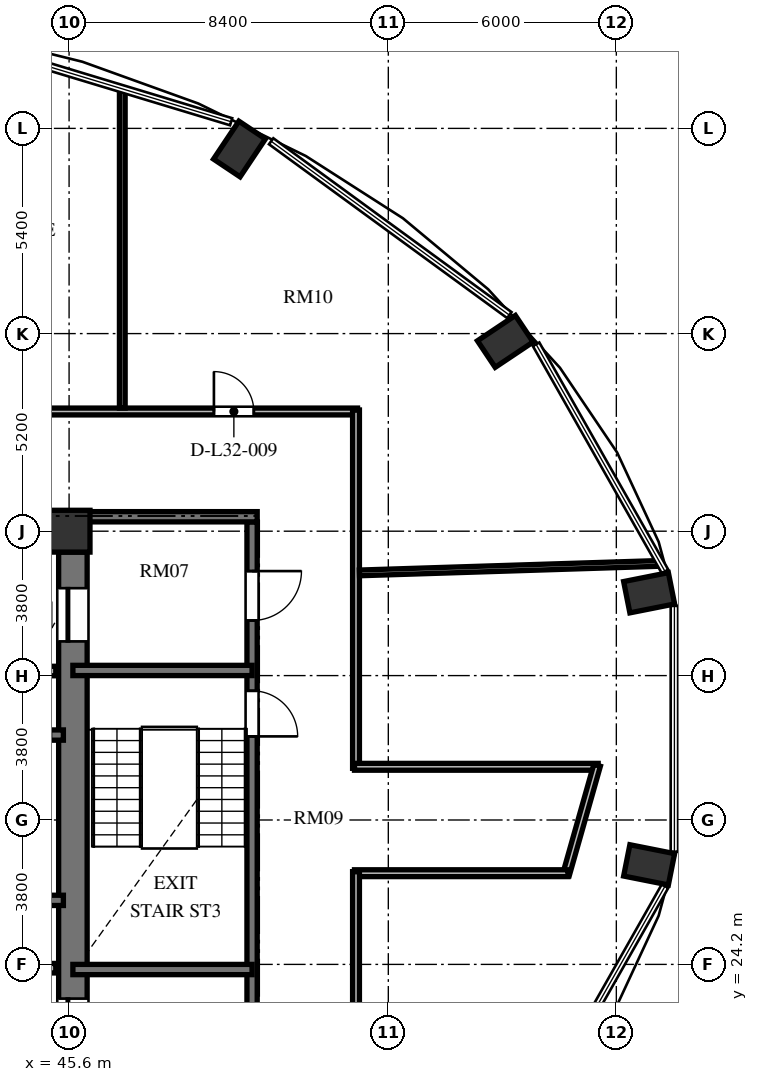
"""IFC4 building model, lengths in metres.
Left out: names, types, materials, properties, quantities, classifications, styles, units other than length and angle.
Written with IfcOpenShell. Run it as: python <this file> out.ifc"""

import sys

from ifc_helpers import new_model, si_unit, direction, frame, frame_2d, origin, origin_2d, place, context, subcontext, project, spatial, rectangle, extrude, element, fill, save


model = new_model("IFC4")
c1 = context("Model", 3, precision=1e-05, world=origin(), true_north=direction((0.0, 1.0)))
c2 = subcontext(c1, "Body", "Model", "MODEL_VIEW")
j1 = project(units=[si_unit("LENGTHUNIT", "METRE"), si_unit("PLANEANGLEUNIT", "RADIAN")], contexts=[c1])
p1 = place(None, origin())
s1 = spatial("IfcSite", under=j1, at=p1, CompositionType="ELEMENT")
p2 = place(p1, origin())
s2 = spatial("IfcBuilding", under=s1, at=p2, CompositionType="ELEMENT")
p3 = place(p2, frame((0.0, 0.0, 125.52)))
s3 = spatial("IfcBuildingStorey", under=s2, at=p3, CompositionType="ELEMENT", Elevation=125.52)
for number, where, z_axis, x_axis in (
    (1, (60.863, 26.82, 0.0), (0.0, 0.0, 1.0), (0.981, -0.195, 0.0)),
    (2, (60.863, 33.98, 0.0), (0.0, 0.0, 1.0), (0.981, 0.195, 0.0)),
    (3, (57.078, 40.595, 0.0), (0.0, 0.0, 1.0), (0.831, 0.556, 0.0)),
    (4, (50.084, 45.657, 0.0), (0.0, 0.0, 1.0), (0.556, 0.831, 0.0)),
):
    element("IfcColumn", number, at=place(p3, frame(where, z_axis=z_axis, x_axis=x_axis)), inside=s3, PredefinedType="COLUMN", context=c2, shape_type="SweptSolid", body=[
        extrude(rectangle(XDim=1.2, YDim=0.84, at=origin_2d()), origin(), (0.0, 0.0, 1.0), 3.648),
    ])
p4 = place(p3, frame((45.6, 35.6, 0.0), z_axis=(0.0, 0.0, 1.0), x_axis=(1.0, 0.0, 0.0)))
e5 = element("IfcColumn", 5, at=p4, inside=s3, PredefinedType="COLUMN", context=c2, shape_type="SweptSolid", body=[
    extrude(rectangle(XDim=1.1, YDim=1.1, at=origin_2d()), origin(), (0.0, 0.0, 1.0), 3.648),
])
p5 = place(p3, frame((45.7, 20.95, 0.0), z_axis=(0.0, 0.0, 1.0), x_axis=(0.0, 1.0, 0.0)))
e6 = element("IfcWall", 6, at=p5, inside=s3, PredefinedType="SHEAR", context=c2, shape_type="SweptSolid", body=[
    extrude(rectangle(XDim=14.1, YDim=0.75, at=frame_2d((7.05, 0.0))), origin(), (0.0, 0.0, 1.0), 3.648),
])
p6 = place(p5, frame((11.75, 0.0, 0.0)))
e7 = element("IfcOpeningElement", 7, at=p6, cuts=e6, PredefinedType="OPENING", context=c2, shape_type="SweptSolid", body=[
    extrude(rectangle(XDim=1.4, YDim=2.3, at=frame_2d((0.7, 1.15))), frame((0.0, 0.385, 0.0), z_axis=(0.0, -1.0, 0.0), x_axis=(1.0, 0.0, 0.0)), (0.0, 0.0, 1.0), 0.77),
])
p7 = place(p5, frame((0.95, 0.0, 0.0)))
e8 = element("IfcOpeningElement", 8, at=p7, cuts=e6, PredefinedType="OPENING", context=c2, shape_type="SweptSolid", body=[
    extrude(rectangle(XDim=1.4, YDim=2.3, at=frame_2d((0.7, 1.15))), frame((0.0, 0.385, 0.0), z_axis=(0.0, -1.0, 0.0), x_axis=(1.0, 0.0, 0.0)), (0.0, 0.0, 1.0), 0.77),
])
p8 = place(p3, frame((37.465, 30.235, 0.0), z_axis=(0.0, 0.0, 1.0), x_axis=(1.0, 0.0, 0.0)))
e9 = element("IfcWall", 9, at=p8, inside=s3, PredefinedType="SHEAR", context=c2, shape_type="SweptSolid", body=[
    extrude(rectangle(XDim=7.985, YDim=0.27, at=frame_2d((3.992, 0.0))), origin(), (0.0, 0.0, 1.0), 3.648),
])
p9 = place(p8, frame((6.455, 0.0, 0.0)))
e10 = element("IfcOpeningElement", 10, at=p9, cuts=e9, PredefinedType="OPENING", context=c2, shape_type="SweptSolid", body=[
    extrude(rectangle(XDim=1.2, YDim=2.15, at=frame_2d((0.6, 1.075))), frame((0.0, 0.145, 0.0), z_axis=(0.0, -1.0, 0.0), x_axis=(1.0, 0.0, 0.0)), (0.0, 0.0, 1.0), 0.29),
])
p10 = place(p3, frame((37.465, 25.885, 0.0), z_axis=(0.0, 0.0, 1.0), x_axis=(1.0, 0.0, 0.0)))
e11 = element("IfcWall", 11, at=p10, inside=s3, PredefinedType="SHEAR", context=c2, shape_type="SweptSolid", body=[
    extrude(rectangle(XDim=7.985, YDim=0.27, at=frame_2d((3.992, 0.0))), origin(), (0.0, 0.0, 1.0), 3.648),
])
for number, where, z_axis, x_axis in (
    (12, (42.95, 31.92, 0.0), (0.0, 0.0, 1.0), (1.0, 0.0, 0.0)),
    (13, (42.95, 24.1, 0.0), (0.0, 0.0, 1.0), (1.0, 0.0, 0.0)),
):
    element("IfcWall", number, at=place(p3, frame(where, z_axis=z_axis, x_axis=x_axis)), inside=s3, PredefinedType="SOLIDWALL", context=c2, shape_type="SweptSolid", body=[
        extrude(rectangle(XDim=2.3, YDim=0.25, at=frame_2d((1.15, 0.0))), origin(), (0.0, 0.0, 1.0), 3.428),
    ])
p11 = place(p3, frame((50.415, 35.845, 0.0), z_axis=(0.0, 0.0, 1.0), x_axis=(0.0, -1.0, 0.0)))
e14 = element("IfcWall", 14, at=p11, inside=s3, PredefinedType="SHEAR", context=c2, shape_type="SweptSolid", body=[
    extrude(rectangle(XDim=15.825, YDim=0.27, at=frame_2d((7.913, 0.0))), origin(), (0.0, 0.0, 1.0), 3.648),
])
p12 = place(p11, frame((4.445, 0.0, 0.0)))
e15 = element("IfcOpeningElement", 15, at=p12, cuts=e14, PredefinedType="OPENING", context=c2, shape_type="SweptSolid", body=[
    extrude(rectangle(XDim=1.2, YDim=2.15, at=frame_2d((0.6, 1.075))), frame((0.0, 0.145, 0.0), z_axis=(0.0, -1.0, 0.0), x_axis=(1.0, 0.0, 0.0)), (0.0, 0.0, 1.0), 0.29),
])
p13 = place(p11, frame((1.295, 0.0, 0.0)))
e16 = element("IfcOpeningElement", 16, at=p13, cuts=e14, PredefinedType="OPENING", context=c2, shape_type="SweptSolid", body=[
    extrude(rectangle(XDim=1.3, YDim=2.2, at=frame_2d((0.65, 1.1))), frame((0.0, 0.145, 0.0), z_axis=(0.0, -1.0, 0.0), x_axis=(1.0, 0.0, 0.0)), (0.0, 0.0, 1.0), 0.29),
])
p14 = place(p11, frame((13.095, 0.0, 0.0)))
e17 = element("IfcOpeningElement", 17, at=p14, cuts=e14, PredefinedType="OPENING", context=c2, shape_type="SweptSolid", body=[
    extrude(rectangle(XDim=1.3, YDim=2.2, at=frame_2d((0.65, 1.1))), frame((0.0, 0.145, 0.0), z_axis=(0.0, -1.0, 0.0), x_axis=(1.0, 0.0, 0.0)), (0.0, 0.0, 1.0), 0.29),
])
p15 = place(p3, frame((46.075, 35.98, 0.0), z_axis=(0.0, 0.0, 1.0), x_axis=(1.0, 0.0, 0.0)))
e18 = element("IfcWall", 18, at=p15, inside=s3, PredefinedType="SHEAR", context=c2, shape_type="SweptSolid", body=[
    extrude(rectangle(XDim=4.475, YDim=0.27, at=frame_2d((2.238, 0.0))), origin(), (0.0, 0.0, 1.0), 3.648),
])
for number, where, z_axis, x_axis in (
    (19, (45.7, 31.935, 0.0), (0.0, 0.0, 1.0), (1.0, 0.0, 0.0)),
    (20, (45.7, 24.065, 0.0), (0.0, 0.0, 1.0), (1.0, 0.0, 0.0)),
):
    element("IfcWall", number, at=place(p3, frame(where, z_axis=z_axis, x_axis=x_axis)), inside=s3, PredefinedType="SHEAR", context=c2, shape_type="SweptSolid", body=[
        extrude(rectangle(XDim=4.715, YDim=0.27, at=frame_2d((2.357, 0.0))), origin(), (0.0, 0.0, 1.0), 3.648),
    ])
p16 = place(p3, frame((23.31, 38.75, 0.0), z_axis=(0.0, 0.0, 1.0), x_axis=(1.0, 0.0, 0.0)))
e21 = element("IfcWall", 21, at=p16, inside=s3, PredefinedType="PARTITIONING", context=c2, shape_type="SweptSolid", body=[
    extrude(rectangle(XDim=29.88, YDim=0.18, at=frame_2d((14.94, 0.0))), origin(), (0.0, 0.0, 1.0), 3.053),
])
p17 = place(p16, frame((26.101, 0.0, 0.0)))
e22 = element("IfcOpeningElement", 22, at=p17, cuts=e21, PredefinedType="OPENING", context=c2, shape_type="SweptSolid", body=[
    extrude(rectangle(XDim=1.05, YDim=2.15, at=frame_2d((0.525, 1.075))), frame((0.0, 0.1, 0.0), z_axis=(0.0, -1.0, 0.0), x_axis=(1.0, 0.0, 0.0)), (0.0, 0.0, 1.0), 0.2),
])
p18 = place(p16, frame((15.74, 0.0, 0.0)))
e23 = element("IfcOpeningElement", 23, at=p18, cuts=e21, PredefinedType="OPENING", context=c2, shape_type="SweptSolid", body=[
    extrude(rectangle(XDim=1.4, YDim=2.2, at=frame_2d((0.7, 1.1))), frame((0.0, 0.1, 0.0), z_axis=(0.0, -1.0, 0.0), x_axis=(1.0, 0.0, 0.0)), (0.0, 0.0, 1.0), 0.2),
])
p19 = place(p16, frame((6.665, 0.0, 0.0)))
e24 = element("IfcOpeningElement", 24, at=p19, cuts=e21, PredefinedType="OPENING", context=c2, shape_type="SweptSolid", body=[
    extrude(rectangle(XDim=1.05, YDim=2.15, at=frame_2d((0.525, 1.075))), frame((0.0, 0.1, 0.0), z_axis=(0.0, -1.0, 0.0), x_axis=(1.0, 0.0, 0.0)), (0.0, 0.0, 1.0), 0.2),
])
p20 = place(p3, frame((53.15, 38.79, 0.0), z_axis=(0.0, 0.0, 1.0), x_axis=(0.0, -1.0, 0.0)))
e25 = element("IfcWall", 25, at=p20, inside=s3, PredefinedType="PARTITIONING", context=c2, shape_type="SweptSolid", body=[
    extrude(rectangle(XDim=9.43, YDim=0.18, at=frame_2d((4.715, 0.0))), origin(), (0.0, 0.0, 1.0), 3.428),
])
p21 = place(p3, frame((53.11, 29.4, 0.0), z_axis=(0.0, 0.0, 1.0), x_axis=(1.0, 0.0, 0.0)))
e26 = element("IfcWall", 26, at=p21, inside=s3, PredefinedType="PARTITIONING", context=c2, shape_type="SweptSolid", body=[
    extrude(rectangle(XDim=6.413, YDim=0.18, at=frame_2d((3.206, 0.0))), origin(), (0.0, 0.0, 1.0), 3.428),
])
p22 = place(p3, frame((59.494, 29.438, 0.0), z_axis=(0.0, 0.0, 1.0), x_axis=(-0.273222154729, -0.961950962453, 0.0)))
e27 = element("IfcWall", 27, at=p22, inside=s3, PredefinedType="PARTITIONING", context=c2, shape_type="SweptSolid", body=[
    extrude(rectangle(XDim=2.991, YDim=0.18, at=frame_2d((1.495, 0.0))), origin(), (0.0, 0.0, 1.0), 3.428),
])
p23 = place(p3, frame((58.727, 26.6, 0.0), z_axis=(0.0, 0.0, 1.0), x_axis=(-1.0, 0.0, 0.0)))
e28 = element("IfcWall", 28, at=p23, inside=s3, PredefinedType="PARTITIONING", context=c2, shape_type="SweptSolid", body=[
    extrude(rectangle(XDim=5.617, YDim=0.18, at=frame_2d((2.809, 0.0))), origin(), (0.0, 0.0, 1.0), 3.428),
])
p24 = place(p3, frame((53.15, 26.64, 0.0), z_axis=(0.0, 0.0, 1.0), x_axis=(0.0, -1.0, 0.0)))
e29 = element("IfcWall", 29, at=p24, inside=s3, PredefinedType="PARTITIONING", context=c2, shape_type="SweptSolid", body=[
    extrude(rectangle(XDim=6.66, YDim=0.18, at=frame_2d((3.33, 0.0))), origin(), (0.0, 0.0, 1.0), 3.428),
])
p25 = place(p3, frame((53.24, 34.502, 0.0), z_axis=(0.0, 0.0, 1.0), x_axis=(0.999499445349, 0.031636351679, 0.0)))
e30 = element("IfcWall", 30, at=p25, inside=s3, PredefinedType="PARTITIONING", context=c2, shape_type="SweptSolid", body=[
    extrude(rectangle(XDim=7.933, YDim=0.15, at=frame_2d((3.967, 0.0))), origin(), (0.0, 0.0, 1.0), 2.813),
])
p26 = place(p3, frame((47.0, 38.84, 0.0), z_axis=(0.0, 0.0, 1.0), x_axis=(0.0, 1.0, 0.0)))
e31 = element("IfcWall", 31, at=p26, inside=s3, PredefinedType="PARTITIONING", context=c2, shape_type="SweptSolid", body=[
    extrude(rectangle(XDim=8.387, YDim=0.15, at=frame_2d((4.193, 0.0))), origin(), (0.0, 0.0, 1.0), 3.428),
])
p27 = place(p6, origin())
e32 = element("IfcDoor", 32, at=p27, inside=s3, OperationType="SLIDING_TO_LEFT", PredefinedType="DOOR", context=c2, shape_type="SweptSolid", body=[
    extrude(rectangle(XDim=1.4, YDim=2.3, at=frame_2d((0.7, 1.15))), frame((0.0, 0.025, 0.0), z_axis=(0.0, -1.0, 0.0), x_axis=(1.0, 0.0, 0.0)), (0.0, 0.0, 1.0), 0.05),
])
fill(e7, e32)
p28 = place(p7, origin())
e33 = element("IfcDoor", 33, at=p28, inside=s3, OperationType="SLIDING_TO_LEFT", PredefinedType="DOOR", context=c2, shape_type="SweptSolid", body=[
    extrude(rectangle(XDim=1.4, YDim=2.3, at=frame_2d((0.7, 1.15))), frame((0.0, 0.025, 0.0), z_axis=(0.0, -1.0, 0.0), x_axis=(1.0, 0.0, 0.0)), (0.0, 0.0, 1.0), 0.05),
])
fill(e8, e33)
p29 = place(p12, origin())
e34 = element("IfcDoor", 34, at=p29, inside=s3, OperationType="SINGLE_SWING_RIGHT", PredefinedType="DOOR", context=c2, shape_type="SweptSolid", body=[
    extrude(rectangle(XDim=1.2, YDim=2.15, at=frame_2d((0.6, 1.075))), frame((0.0, 0.025, 0.0), z_axis=(0.0, -1.0, 0.0), x_axis=(1.0, 0.0, 0.0)), (0.0, 0.0, 1.0), 0.05),
])
fill(e15, e34)
p30 = place(p13, origin())
e35 = element("IfcDoor", 35, at=p30, inside=s3, OperationType="SINGLE_SWING_LEFT", PredefinedType="DOOR", context=c2, shape_type="SweptSolid", body=[
    extrude(rectangle(XDim=1.3, YDim=2.2, at=frame_2d((0.65, 1.1))), frame((0.0, 0.025, 0.0), z_axis=(0.0, -1.0, 0.0), x_axis=(1.0, 0.0, 0.0)), (0.0, 0.0, 1.0), 0.05),
])
fill(e16, e35)
p31 = place(p17, origin())
e36 = element("IfcDoor", 36, at=p31, inside=s3, OperationType="SINGLE_SWING_LEFT", PredefinedType="DOOR", context=c2, shape_type="SweptSolid", body=[
    extrude(rectangle(XDim=1.05, YDim=2.15, at=frame_2d((0.525, 1.075))), frame((0.0, 0.025, 0.0), z_axis=(0.0, -1.0, 0.0), x_axis=(1.0, 0.0, 0.0)), (0.0, 0.0, 1.0), 0.05),
])
fill(e22, e36)
save(model, sys.argv[1])
